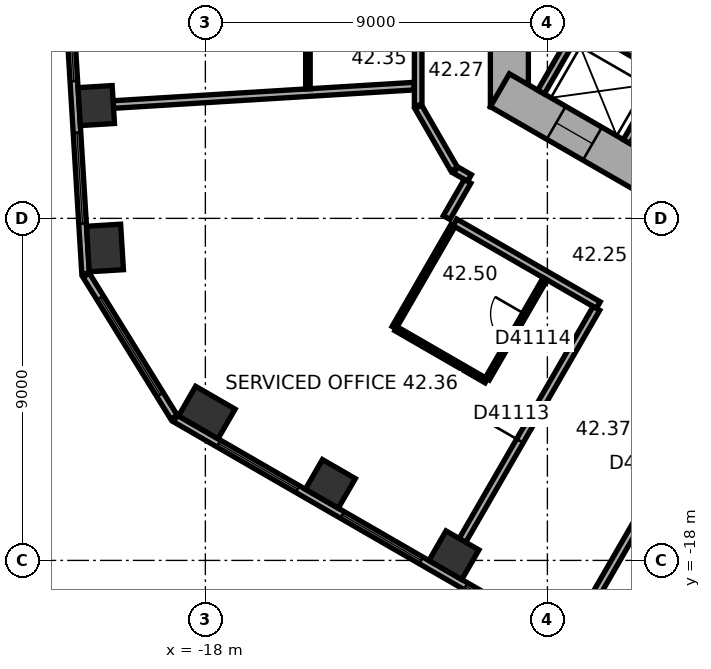
"""IFC4 building model, lengths in metres.
Left out: names, types, materials, properties, quantities, classifications, styles, units other than length and angle.
Written with IfcOpenShell. Run it as: python <this file> out.ifc"""

import sys

from ifc_helpers import new_model, si_unit, direction, frame, frame_2d, origin, origin_2d, place, context, subcontext, project, spatial, rectangle, extrude, element, fill, save


model = new_model("IFC4")
c1 = context("Model", 3, precision=1e-05, world=origin(), true_north=direction((0.0, 1.0)))
c2 = subcontext(c1, "Body", "Model", "MODEL_VIEW")
j1 = project(units=[si_unit("LENGTHUNIT", "METRE"), si_unit("PLANEANGLEUNIT", "RADIAN")], contexts=[c1])
p1 = place(None, origin())
s1 = spatial("IfcSite", under=j1, at=p1, CompositionType="ELEMENT")
p2 = place(p1, origin())
s2 = spatial("IfcBuilding", under=s1, at=p2, CompositionType="ELEMENT")
p3 = place(p2, frame((0.0, 0.0, 172.5)))
s3 = spatial("IfcBuildingStorey", under=s2, at=p3, CompositionType="ELEMENT", Elevation=172.5)
p4 = place(p3, frame((-20.871, -6.032, 0.0), z_axis=(0.0, 0.0, 1.0), x_axis=(0.061048539535, -0.998134798422, 0.0)))
e1 = element("IfcColumn", 1, at=p4, inside=s3, PredefinedType="COLUMN", context=c2, shape_type="SweptSolid", body=[
    extrude(rectangle(XDim=1.0, YDim=0.9, at=origin_2d()), origin(), (0.0, 0.0, 1.0), 3.7),
])
for number, where, z_axis, x_axis in (
    (2, (-20.642, -9.779, 0.0), (0.0, 0.0, 1.0), (0.061, -0.998, 0.0)),
    (3, (-17.962, -14.109, 0.0), (0.0, 0.0, 1.0), (0.866, -0.5, 0.0)),
):
    element("IfcColumn", number, at=place(p3, frame(where, z_axis=z_axis, x_axis=x_axis)), inside=s3, PredefinedType="COLUMN", context=c2, shape_type="SweptSolid", body=[
        extrude(rectangle(XDim=1.2, YDim=0.9, at=origin_2d()), origin(), (0.0, 0.0, 1.0), 3.7),
    ])
for number, where, z_axis, x_axis in (
    (4, (-14.711, -15.986, 0.0), (0.0, 0.0, 1.0), (0.866, -0.5, 0.0)),
    (5, (-11.46, -17.863, 0.0), (0.0, 0.0, 1.0), (0.866, -0.5, 0.0)),
):
    element("IfcColumn", number, at=place(p3, frame(where, z_axis=z_axis, x_axis=x_axis)), inside=s3, PredefinedType="COLUMN", context=c2, shape_type="SweptSolid", body=[
        extrude(rectangle(XDim=1.0, YDim=0.9, at=origin_2d()), origin(), (0.0, 0.0, 1.0), 3.7),
    ])
p5 = place(p3, frame((-10.0, 6.062, 0.0), z_axis=(0.0, 0.0, 1.0), x_axis=(0.0, -1.0, 0.0)))
e6 = element("IfcWall", 6, at=p5, inside=s3, PredefinedType="SHEAR", context=c2, shape_type="SweptSolid", body=[
    extrude(rectangle(XDim=12.125, YDim=1.0, at=frame_2d((6.062, 0.0))), origin(), (0.0, 0.0, 1.0), 3.7),
])
p6 = place(p5, frame((5.212, 0.0, 0.0)))
e7 = element("IfcOpeningElement", 7, at=p6, cuts=e6, PredefinedType="OPENING", context=c2, shape_type="SweptSolid", body=[
    extrude(rectangle(XDim=1.1, YDim=2.1, at=frame_2d((0.55, 1.05))), frame((0.0, 0.51, 0.0), z_axis=(0.0, -1.0, 0.0), x_axis=(1.0, 0.0, 0.0)), (0.0, 0.0, 1.0), 1.02),
])
p7 = place(p5, frame((7.812, 0.0, 0.0)))
e8 = element("IfcOpeningElement", 8, at=p7, cuts=e6, PredefinedType="OPENING", context=c2, shape_type="SweptSolid", body=[
    extrude(rectangle(XDim=1.1, YDim=2.1, at=frame_2d((0.55, 1.05))), frame((0.0, 0.51, 0.0), z_axis=(0.0, -1.0, 0.0), x_axis=(1.0, 0.0, 0.0)), (0.0, 0.0, 1.0), 1.02),
])
p8 = place(p3, frame((-10.25, -5.629, 0.0), z_axis=(0.0, 0.0, 1.0), x_axis=(0.866022616891, -0.50000482701, 0.0)))
e9 = element("IfcWall", 9, at=p8, inside=s3, PredefinedType="SHEAR", context=c2, shape_type="SweptSolid", body=[
    extrude(rectangle(XDim=12.125, YDim=1.0, at=frame_2d((6.062, 0.0))), origin(), (0.0, 0.0, 1.0), 3.7),
])
p9 = place(p8, frame((6.262, 0.0, 0.0)))
e10 = element("IfcOpeningElement", 10, at=p9, cuts=e9, PredefinedType="OPENING", context=c2, shape_type="SweptSolid", body=[
    extrude(rectangle(XDim=1.5, YDim=2.1, at=frame_2d((0.75, 1.05))), frame((0.0, 0.51, 0.0), z_axis=(0.0, -1.0, 0.0), x_axis=(1.0, 0.0, 0.0)), (0.0, 0.0, 1.0), 1.02),
])
p10 = place(p8, frame((1.712, 0.0, 0.0)))
e11 = element("IfcOpeningElement", 11, at=p10, cuts=e9, PredefinedType="OPENING", context=c2, shape_type="SweptSolid", body=[
    extrude(rectangle(XDim=1.1, YDim=2.1, at=frame_2d((0.55, 1.05))), frame((0.0, 0.51, 0.0), z_axis=(0.0, -1.0, 0.0), x_axis=(1.0, 0.0, 0.0)), (0.0, 0.0, 1.0), 1.02),
])
p11 = place(p8, frame((4.312, 0.0, 0.0)))
e12 = element("IfcOpeningElement", 12, at=p11, cuts=e9, PredefinedType="OPENING", context=c2, shape_type="SweptSolid", body=[
    extrude(rectangle(XDim=1.1, YDim=2.1, at=frame_2d((0.55, 1.05))), frame((0.0, 0.51, 0.0), z_axis=(0.0, -1.0, 0.0), x_axis=(1.0, 0.0, 0.0)), (0.0, 0.0, 1.0), 1.02),
])
p12 = place(p3, frame((-22.375, 9.557, 0.0), z_axis=(0.0, 0.0, 1.0), x_axis=(0.061036015339, -0.998135564356, 0.0)))
e13 = element("IfcWall", 13, at=p12, inside=s3, PredefinedType="STANDARD", context=c2, shape_type="SweptSolid", body=[
    extrude(rectangle(XDim=20.044, YDim=0.2, at=frame_2d((10.022, 0.0))), origin(), (0.0, 0.0, 1.0), 3.7),
])
p13 = place(p12, frame((1.313, 0.0, 0.9)))
e14 = element("IfcOpeningElement", 14, at=p13, cuts=e13, PredefinedType="OPENING", context=c2, shape_type="SweptSolid", body=[
    extrude(rectangle(XDim=2.4, YDim=2.0, at=frame_2d((1.2, 1.0))), frame((0.0, 0.11, 0.0), z_axis=(0.0, -1.0, 0.0), x_axis=(1.0, 0.0, 0.0)), (0.0, 0.0, 1.0), 0.22),
])
p14 = place(p12, frame((5.067, 0.0, 0.9)))
e15 = element("IfcOpeningElement", 15, at=p14, cuts=e13, PredefinedType="OPENING", context=c2, shape_type="SweptSolid", body=[
    extrude(rectangle(XDim=2.4, YDim=2.0, at=frame_2d((1.2, 1.0))), frame((0.0, 0.11, 0.0), z_axis=(0.0, -1.0, 0.0), x_axis=(1.0, 0.0, 0.0)), (0.0, 0.0, 1.0), 0.22),
])
p15 = place(p12, frame((8.821, 0.0, 0.9)))
e16 = element("IfcOpeningElement", 16, at=p15, cuts=e13, PredefinedType="OPENING", context=c2, shape_type="SweptSolid", body=[
    extrude(rectangle(XDim=2.4, YDim=2.0, at=frame_2d((1.2, 1.0))), frame((0.0, 0.11, 0.0), z_axis=(0.0, -1.0, 0.0), x_axis=(1.0, 0.0, 0.0)), (0.0, 0.0, 1.0), 0.22),
])
p16 = place(p12, frame((12.575, 0.0, 0.9)))
e17 = element("IfcOpeningElement", 17, at=p16, cuts=e13, PredefinedType="OPENING", context=c2, shape_type="SweptSolid", body=[
    extrude(rectangle(XDim=2.4, YDim=2.0, at=frame_2d((1.2, 1.0))), frame((0.0, 0.11, 0.0), z_axis=(0.0, -1.0, 0.0), x_axis=(1.0, 0.0, 0.0)), (0.0, 0.0, 1.0), 0.22),
])
p17 = place(p12, frame((16.329, 0.0, 0.9)))
e18 = element("IfcOpeningElement", 18, at=p17, cuts=e13, PredefinedType="OPENING", context=c2, shape_type="SweptSolid", body=[
    extrude(rectangle(XDim=2.4, YDim=2.0, at=frame_2d((1.2, 1.0))), frame((0.0, 0.11, 0.0), z_axis=(0.0, -1.0, 0.0), x_axis=(1.0, 0.0, 0.0)), (0.0, 0.0, 1.0), 0.22),
])
p18 = place(p3, frame((-21.137, -10.496, 0.0), z_axis=(0.0, 0.0, 1.0), x_axis=(0.526178661629, -0.850374044786, 0.0)))
e19 = element("IfcWall", 19, at=p18, inside=s3, PredefinedType="STANDARD", context=c2, shape_type="SweptSolid", body=[
    extrude(rectangle(XDim=4.395, YDim=0.2, at=frame_2d((2.197, 0.0))), origin(), (0.0, 0.0, 1.0), 3.7),
])
p19 = place(p18, frame((0.698, 0.0, 0.9)))
e20 = element("IfcOpeningElement", 20, at=p19, cuts=e19, PredefinedType="OPENING", context=c2, shape_type="SweptSolid", body=[
    extrude(rectangle(XDim=3.0, YDim=2.0, at=frame_2d((1.5, 1.0))), frame((0.0, 0.11, 0.0), z_axis=(0.0, -1.0, 0.0), x_axis=(1.0, 0.0, 0.0)), (0.0, 0.0, 1.0), 0.22),
])
p20 = place(p3, frame((-18.789, -14.267, 0.0), z_axis=(0.0, 0.0, 1.0), x_axis=(0.866023315909, -0.500003616288, 0.0)))
e21 = element("IfcWall", 21, at=p20, inside=s3, PredefinedType="STANDARD", context=c2, shape_type="SweptSolid", body=[
    extrude(rectangle(XDim=20.044, YDim=0.2, at=frame_2d((10.022, 0.0))), origin(), (0.0, 0.0, 1.0), 3.7),
])
p21 = place(p20, frame((1.314, 0.0, 0.9)))
e22 = element("IfcOpeningElement", 22, at=p21, cuts=e21, PredefinedType="OPENING", context=c2, shape_type="SweptSolid", body=[
    extrude(rectangle(XDim=2.4, YDim=2.0, at=frame_2d((1.2, 1.0))), frame((0.0, 0.11, 0.0), z_axis=(0.0, -1.0, 0.0), x_axis=(1.0, 0.0, 0.0)), (0.0, 0.0, 1.0), 0.22),
])
p22 = place(p20, frame((5.069, 0.0, 0.9)))
e23 = element("IfcOpeningElement", 23, at=p22, cuts=e21, PredefinedType="OPENING", context=c2, shape_type="SweptSolid", body=[
    extrude(rectangle(XDim=2.4, YDim=2.0, at=frame_2d((1.2, 1.0))), frame((0.0, 0.11, 0.0), z_axis=(0.0, -1.0, 0.0), x_axis=(1.0, 0.0, 0.0)), (0.0, 0.0, 1.0), 0.22),
])
p23 = place(p20, frame((8.823, 0.0, 0.9)))
e24 = element("IfcOpeningElement", 24, at=p23, cuts=e21, PredefinedType="OPENING", context=c2, shape_type="SweptSolid", body=[
    extrude(rectangle(XDim=2.4, YDim=2.0, at=frame_2d((1.2, 1.0))), frame((0.0, 0.11, 0.0), z_axis=(0.0, -1.0, 0.0), x_axis=(1.0, 0.0, 0.0)), (0.0, 0.0, 1.0), 0.22),
])
p24 = place(p20, frame((12.577, 0.0, 0.9)))
e25 = element("IfcOpeningElement", 25, at=p24, cuts=e21, PredefinedType="OPENING", context=c2, shape_type="SweptSolid", body=[
    extrude(rectangle(XDim=2.4, YDim=2.0, at=frame_2d((1.2, 1.0))), frame((0.0, 0.11, 0.0), z_axis=(0.0, -1.0, 0.0), x_axis=(1.0, 0.0, 0.0)), (0.0, 0.0, 1.0), 0.22),
])
p25 = place(p20, frame((16.331, 0.0, 0.9)))
e26 = element("IfcOpeningElement", 26, at=p25, cuts=e21, PredefinedType="OPENING", context=c2, shape_type="SweptSolid", body=[
    extrude(rectangle(XDim=2.4, YDim=2.0, at=frame_2d((1.2, 1.0))), frame((0.0, 0.11, 0.0), z_axis=(0.0, -1.0, 0.0), x_axis=(1.0, 0.0, 0.0)), (0.0, 0.0, 1.0), 0.22),
])
p26 = place(p3, frame((-8.203, -3.809, 0.0), z_axis=(0.0, 0.0, 1.0), x_axis=(0.866028230842, -0.499995103361, 0.0)))
e27 = element("IfcWall", 27, at=p26, inside=s3, PredefinedType="PARTITIONING", context=c2, shape_type="SweptSolid", body=[
    extrude(rectangle(XDim=5.4, YDim=0.2, at=frame_2d((2.7, 0.0))), origin(), (0.0, 0.0, 1.0), 3.42),
])
for number, where, z_axis, x_axis in (
    (28, (-8.067, -3.772, 0.0), (0.0, 0.0, 1.0), (-0.5, -0.866, 0.0)),
    (29, (-5.815, -5.072, 0.0), (0.0, 0.0, 1.0), (-0.5, -0.866, 0.0)),
):
    element("IfcWall", number, at=place(p3, frame(where, z_axis=z_axis, x_axis=x_axis)), inside=s3, PredefinedType="PARTITIONING", context=c2, shape_type="SweptSolid", body=[
        extrude(rectangle(XDim=2.2, YDim=0.2, at=frame_2d((1.1, 0.0))), origin(), (0.0, 0.0, 1.0), 3.42),
    ])
p27 = place(p3, frame((-20.421, -6.005, 0.0), z_axis=(0.0, 0.0, 1.0), x_axis=(0.998134865741, 0.061047438866, 0.0)))
e30 = element("IfcWall", 30, at=p27, inside=s3, PredefinedType="PARTITIONING", context=c2, shape_type="SweptSolid", body=[
    extrude(rectangle(XDim=7.927, YDim=0.2, at=frame_2d((3.963, 0.0))), origin(), (0.0, 0.0, 1.0), 2.87),
])
p28 = place(p3, frame((-15.301, 1.731, 0.0), z_axis=(0.0, 0.0, 1.0), x_axis=(0.0, -1.0, 0.0)))
e31 = element("IfcWall", 31, at=p28, inside=s3, PredefinedType="PARTITIONING", context=c2, shape_type="SweptSolid", body=[
    extrude(rectangle(XDim=7.322, YDim=0.12, at=frame_2d((3.661, 0.0))), origin(), (0.0, 0.0, 1.0), 3.42),
])
p29 = place(p28, frame((0.55, 0.0, 0.0)))
e32 = element("IfcOpeningElement", 32, at=p29, cuts=e31, PredefinedType="OPENING", context=c2, shape_type="SweptSolid", body=[
    extrude(rectangle(XDim=1.0, YDim=2.1, at=frame_2d((0.5, 1.05))), frame((0.0, 0.07, 0.0), z_axis=(0.0, -1.0, 0.0), x_axis=(1.0, 0.0, 0.0)), (0.0, 0.0, 1.0), 0.14),
])
p30 = place(p28, frame((2.736, 0.0, 0.0)))
e33 = element("IfcOpeningElement", 33, at=p30, cuts=e31, PredefinedType="OPENING", context=c2, shape_type="SweptSolid", body=[
    extrude(rectangle(XDim=0.9, YDim=2.1, at=frame_2d((0.45, 1.05))), frame((0.0, 0.07, 0.0), z_axis=(0.0, -1.0, 0.0), x_axis=(1.0, 0.0, 0.0)), (0.0, 0.0, 1.0), 0.14),
])
p31 = place(p28, frame((5.347, 0.0, 0.0)))
e34 = element("IfcOpeningElement", 34, at=p31, cuts=e31, PredefinedType="OPENING", context=c2, shape_type="SweptSolid", body=[
    extrude(rectangle(XDim=0.9, YDim=2.1, at=frame_2d((0.45, 1.05))), frame((0.0, 0.07, 0.0), z_axis=(0.0, -1.0, 0.0), x_axis=(1.0, 0.0, 0.0)), (0.0, 0.0, 1.0), 0.14),
])
p32 = place(p3, frame((-13.035, -11.875, 0.0), z_axis=(0.0, 0.0, 1.0), x_axis=(0.500026960575, 0.86600983753, 0.0)))
e35 = element("IfcWall", 35, at=p32, inside=s3, PredefinedType="PARTITIONING", context=c2, shape_type="SweptSolid", body=[
    extrude(rectangle(XDim=3.1, YDim=0.12, at=frame_2d((1.55, 0.0))), origin(), (0.0, 0.0, 1.0), 3.42),
])
p33 = place(p3, frame((-12.4, -6.062, 0.0), z_axis=(0.0, 0.0, 1.0), x_axis=(0.500022797313, -0.86601224135, 0.0)))
e36 = element("IfcWall", 36, at=p33, inside=s3, PredefinedType="PARTITIONING", context=c2, shape_type="SweptSolid", body=[
    extrude(rectangle(XDim=1.9, YDim=0.2, at=frame_2d((0.95, 0.0))), origin(), (0.0, 0.0, 1.0), 3.42),
])
p34 = place(p3, frame((-12.4, -4.201, 0.0), z_axis=(0.0, 0.0, 1.0), x_axis=(0.0, -1.0, 0.0)))
e37 = element("IfcWall", 37, at=p34, inside=s3, PredefinedType="PARTITIONING", context=c2, shape_type="SweptSolid", body=[
    extrude(rectangle(XDim=1.821, YDim=0.2, at=frame_2d((0.911, 0.0))), origin(), (0.0, 0.0, 1.0), 3.42),
])
p35 = place(p3, frame((-11.435, -9.103, 0.0), z_axis=(0.0, 0.0, 1.0), x_axis=(0.866007399799, -0.500031182522, 0.0)))
e38 = element("IfcWall", 38, at=p35, inside=s3, PredefinedType="PARTITIONING", context=c2, shape_type="SweptSolid", body=[
    extrude(rectangle(XDim=4.358, YDim=0.2, at=frame_2d((2.179, 0.0))), origin(), (0.0, 0.0, 1.0), 3.42),
])
p36 = place(p3, frame((-11.415, -7.728, 0.0), z_axis=(0.0, 0.0, 1.0), x_axis=(0.865915281873, -0.500190688257, 0.0)))
e39 = element("IfcWall", 39, at=p36, inside=s3, PredefinedType="PARTITIONING", context=c2, shape_type="SweptSolid", body=[
    extrude(rectangle(XDim=0.421, YDim=0.2, at=frame_2d((0.21, 0.0))), origin(), (0.0, 0.0, 1.0), 3.42),
])
p37 = place(p3, frame((-11.235, -17.474, 0.0), z_axis=(0.0, 0.0, 1.0), x_axis=(0.500009260695, 0.866020057054, 0.0)))
e40 = element("IfcWall", 40, at=p37, inside=s3, PredefinedType="PARTITIONING", context=c2, shape_type="SweptSolid", body=[
    extrude(rectangle(XDim=7.049, YDim=0.2, at=frame_2d((3.524, 0.0))), origin(), (0.0, 0.0, 1.0), 2.87),
])
p38 = place(p37, frame((3.024, 0.0, 0.0)))
e41 = element("IfcOpeningElement", 41, at=p38, cuts=e40, PredefinedType="OPENING", context=c2, shape_type="SweptSolid", body=[
    extrude(rectangle(XDim=1.0, YDim=2.1, at=frame_2d((0.5, 1.05))), frame((0.0, 0.11, 0.0), z_axis=(0.0, -1.0, 0.0), x_axis=(1.0, 0.0, 0.0)), (0.0, 0.0, 1.0), 0.22),
])
p39 = place(p3, frame((-11.101, -8.025, 0.0), z_axis=(0.0, 0.0, 1.0), x_axis=(-0.500074377092, -0.865982457891, 0.0)))
e42 = element("IfcWall", 42, at=p39, inside=s3, PredefinedType="PARTITIONING", context=c2, shape_type="SweptSolid", body=[
    extrude(rectangle(XDim=1.101, YDim=0.2, at=frame_2d((0.55, 0.0))), origin(), (0.0, 0.0, 1.0), 3.42),
])
p40 = place(p3, frame((-10.61, -13.275, 0.0), z_axis=(0.0, 0.0, 1.0), x_axis=(-0.866019409031, 0.500010383074, 0.0)))
e43 = element("IfcWall", 43, at=p40, inside=s3, PredefinedType="PARTITIONING", context=c2, shape_type="SweptSolid", body=[
    extrude(rectangle(XDim=2.74, YDim=0.12, at=frame_2d((1.37, 0.0))), origin(), (0.0, 0.0, 1.0), 3.42),
])
p41 = place(p3, frame((-9.06, -10.59, 0.0), z_axis=(0.0, 0.0, 1.0), x_axis=(-0.49993101378, -0.866065229334, 0.0)))
e44 = element("IfcWall", 44, at=p41, inside=s3, PredefinedType="PARTITIONING", context=c2, shape_type="SweptSolid", body=[
    extrude(rectangle(XDim=3.04, YDim=0.12, at=frame_2d((1.52, 0.0))), origin(), (0.0, 0.0, 1.0), 3.42),
])
p42 = place(p41, frame((1.07, 0.0, 0.0)))
e45 = element("IfcOpeningElement", 45, at=p42, cuts=e44, PredefinedType="OPENING", context=c2, shape_type="SweptSolid", body=[
    extrude(rectangle(XDim=0.9, YDim=2.1, at=frame_2d((0.45, 1.05))), frame((0.0, 0.07, 0.0), z_axis=(0.0, -1.0, 0.0), x_axis=(1.0, 0.0, 0.0)), (0.0, 0.0, 1.0), 0.14),
])
p43 = place(p3, frame((-7.984, -19.351, 0.0), z_axis=(0.0, 0.0, 1.0), x_axis=(0.500010139422, 0.866019549707, 0.0)))
e46 = element("IfcWall", 46, at=p43, inside=s3, PredefinedType="PARTITIONING", context=c2, shape_type="SweptSolid", body=[
    extrude(rectangle(XDim=8.35, YDim=0.2, at=frame_2d((4.175, 0.0))), origin(), (0.0, 0.0, 1.0), 3.42),
])
p44 = place(p43, frame((3.675, 0.0, 0.0)))
e47 = element("IfcOpeningElement", 47, at=p44, cuts=e46, PredefinedType="OPENING", context=c2, shape_type="SweptSolid", body=[
    extrude(rectangle(XDim=1.0, YDim=2.1, at=frame_2d((0.5, 1.05))), frame((0.0, 0.11, 0.0), z_axis=(0.0, -1.0, 0.0), x_axis=(1.0, 0.0, 0.0)), (0.0, 0.0, 1.0), 0.22),
])
p45 = place(p16, origin())
e48 = element("IfcWindow", 48, at=p45, inside=s3, PartitioningType="SINGLE_PANEL", PredefinedType="WINDOW", context=c2, shape_type="SweptSolid", body=[
    extrude(rectangle(XDim=2.4, YDim=2.0, at=frame_2d((1.2, 1.0))), frame((0.0, 0.03, 0.0), z_axis=(0.0, -1.0, 0.0), x_axis=(1.0, 0.0, 0.0)), (0.0, 0.0, 1.0), 0.06),
])
fill(e17, e48)
p46 = place(p17, origin())
e49 = element("IfcWindow", 49, at=p46, inside=s3, PartitioningType="SINGLE_PANEL", PredefinedType="WINDOW", context=c2, shape_type="SweptSolid", body=[
    extrude(rectangle(XDim=2.4, YDim=2.0, at=frame_2d((1.2, 1.0))), frame((0.0, 0.03, 0.0), z_axis=(0.0, -1.0, 0.0), x_axis=(1.0, 0.0, 0.0)), (0.0, 0.0, 1.0), 0.06),
])
fill(e18, e49)
p47 = place(p19, origin())
e50 = element("IfcWindow", 50, at=p47, inside=s3, PartitioningType="SINGLE_PANEL", PredefinedType="WINDOW", context=c2, shape_type="SweptSolid", body=[
    extrude(rectangle(XDim=3.0, YDim=2.0, at=frame_2d((1.5, 1.0))), frame((0.0, 0.03, 0.0), z_axis=(0.0, -1.0, 0.0), x_axis=(1.0, 0.0, 0.0)), (0.0, 0.0, 1.0), 0.06),
])
fill(e20, e50)
p48 = place(p21, origin())
e51 = element("IfcWindow", 51, at=p48, inside=s3, PartitioningType="SINGLE_PANEL", PredefinedType="WINDOW", context=c2, shape_type="SweptSolid", body=[
    extrude(rectangle(XDim=2.4, YDim=2.0, at=frame_2d((1.2, 1.0))), frame((0.0, 0.03, 0.0), z_axis=(0.0, -1.0, 0.0), x_axis=(1.0, 0.0, 0.0)), (0.0, 0.0, 1.0), 0.06),
])
fill(e22, e51)
p49 = place(p22, origin())
e52 = element("IfcWindow", 52, at=p49, inside=s3, PartitioningType="SINGLE_PANEL", PredefinedType="WINDOW", context=c2, shape_type="SweptSolid", body=[
    extrude(rectangle(XDim=2.4, YDim=2.0, at=frame_2d((1.2, 1.0))), frame((0.0, 0.03, 0.0), z_axis=(0.0, -1.0, 0.0), x_axis=(1.0, 0.0, 0.0)), (0.0, 0.0, 1.0), 0.06),
])
fill(e23, e52)
p50 = place(p23, origin())
e53 = element("IfcWindow", 53, at=p50, inside=s3, PartitioningType="SINGLE_PANEL", PredefinedType="WINDOW", context=c2, shape_type="SweptSolid", body=[
    extrude(rectangle(XDim=2.4, YDim=2.0, at=frame_2d((1.2, 1.0))), frame((0.0, 0.03, 0.0), z_axis=(0.0, -1.0, 0.0), x_axis=(1.0, 0.0, 0.0)), (0.0, 0.0, 1.0), 0.06),
])
fill(e24, e53)
p51 = place(p10, origin())
e54 = element("IfcDoor", 54, at=p51, inside=s3, OperationType="DOUBLE_DOOR_SLIDING", PredefinedType="DOOR", context=c2, shape_type="SweptSolid", body=[
    extrude(rectangle(XDim=1.1, YDim=2.1, at=frame_2d((0.55, 1.05))), frame((0.0, 0.025, 0.0), z_axis=(0.0, -1.0, 0.0), x_axis=(1.0, 0.0, 0.0)), (0.0, 0.0, 1.0), 0.05),
])
fill(e11, e54)
p52 = place(p38, origin())
e55 = element("IfcDoor", 55, at=p52, inside=s3, OperationType="SINGLE_SWING_LEFT", PredefinedType="DOOR", context=c2, shape_type="SweptSolid", body=[
    extrude(rectangle(XDim=1.0, YDim=2.1, at=frame_2d((0.5, 1.05))), frame((0.0, 0.025, 0.0), z_axis=(0.0, -1.0, 0.0), x_axis=(1.0, 0.0, 0.0)), (0.0, 0.0, 1.0), 0.05),
])
fill(e41, e55)
p53 = place(p42, origin())
e56 = element("IfcDoor", 56, at=p53, inside=s3, OperationType="SINGLE_SWING_LEFT", PredefinedType="DOOR", context=c2, shape_type="SweptSolid", body=[
    extrude(rectangle(XDim=0.9, YDim=2.1, at=frame_2d((0.45, 1.05))), frame((0.0, 0.025, 0.0), z_axis=(0.0, -1.0, 0.0), x_axis=(1.0, 0.0, 0.0)), (0.0, 0.0, 1.0), 0.05),
])
fill(e45, e56)
save(model, sys.argv[1])
